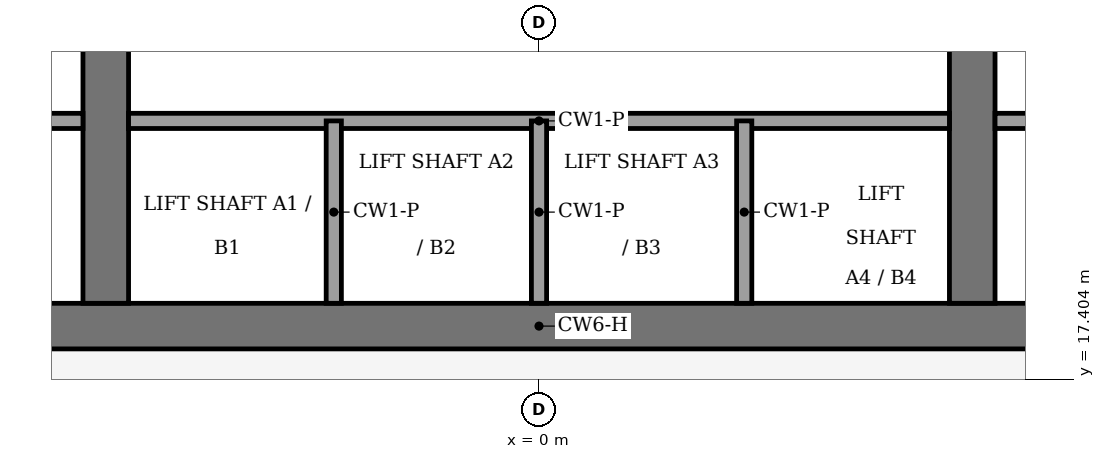
"""IFC4 building model, lengths in metres.
Left out: names, types, materials, properties, quantities, classifications, styles, units other than length and angle.
Written with IfcOpenShell. Run it as: python <this file> out.ifc"""

import sys

from ifc_helpers import new_model, si_unit, direction, frame, frame_2d, origin, place, context, subcontext, project, spatial, rectangle, extrude, element, save


model = new_model("IFC4")
c1 = context("Model", 3, precision=1e-05, world=origin(), true_north=direction((0.0, 1.0)))
c2 = subcontext(c1, "Body", "Model", "MODEL_VIEW")
j1 = project(units=[si_unit("LENGTHUNIT", "METRE"), si_unit("PLANEANGLEUNIT", "RADIAN")], contexts=[c1])
p1 = place(None, origin())
s1 = spatial("IfcSite", under=j1, at=p1, CompositionType="ELEMENT")
p2 = place(p1, origin())
s2 = spatial("IfcBuilding", under=s1, at=p2, CompositionType="ELEMENT")
p3 = place(p2, frame((0.0, 0.0, 340.5)))
s3 = spatial("IfcBuildingStorey", under=s2, at=p3, CompositionType="ELEMENT", Elevation=340.5)
p4 = place(p3, frame((-13.2, 18.1, -0.15), z_axis=(0.0, 0.0, 1.0), x_axis=(1.0, 0.0, 0.0)))
e1 = element("IfcWall", 1, at=p4, inside=s3, PredefinedType="SHEAR", context=c2, shape_type="SweptSolid", body=[
    extrude(rectangle(XDim=26.4, YDim=0.6, at=frame_2d((13.2, 0.0))), origin(), (0.0, 0.0, 1.0), 9.0),
])
p5 = place(p3, frame((-5.7, 18.4, -0.15), z_axis=(0.0, 0.0, 1.0), x_axis=(0.0, 1.0, 0.0)))
e2 = element("IfcWall", 2, at=p5, inside=s3, PredefinedType="SHEAR", context=c2, shape_type="SweptSolid", body=[
    extrude(rectangle(XDim=19.2, YDim=0.6, at=frame_2d((9.6, 0.0))), origin(), (0.0, 0.0, 1.0), 9.0),
])
p6 = place(p5, frame((8.35, 0.0, 0.15)))
e3 = element("IfcOpeningElement", 3, at=p6, cuts=e2, PredefinedType="OPENING", context=c2, shape_type="SweptSolid", body=[
    extrude(rectangle(XDim=0.9, YDim=2.1, at=frame_2d((0.45, 1.05))), frame((0.0, 0.31, 0.0), z_axis=(0.0, -1.0, 0.0), x_axis=(1.0, 0.0, 0.0)), (0.0, 0.0, 1.0), 0.62),
])
p7 = place(p3, frame((5.7, 18.4, -0.15), z_axis=(0.0, 0.0, 1.0), x_axis=(0.0, 1.0, 0.0)))
e4 = element("IfcWall", 4, at=p7, inside=s3, PredefinedType="SHEAR", context=c2, shape_type="SweptSolid", body=[
    extrude(rectangle(XDim=19.2, YDim=0.6, at=frame_2d((9.6, 0.0))), origin(), (0.0, 0.0, 1.0), 9.0),
])
p8 = place(p7, frame((13.3, 0.0, 0.15)))
e5 = element("IfcOpeningElement", 5, at=p8, cuts=e4, PredefinedType="OPENING", context=c2, shape_type="SweptSolid", body=[
    extrude(rectangle(XDim=2.4, YDim=2.4, at=frame_2d((1.2, 1.2))), frame((0.0, 0.31, 0.0), z_axis=(0.0, -1.0, 0.0), x_axis=(1.0, 0.0, 0.0)), (0.0, 0.0, 1.0), 0.62),
])
p9 = place(p3, frame((-12.6, 20.8, 0.0), z_axis=(0.0, 0.0, 1.0), x_axis=(1.0, 0.0, 0.0)))
e6 = element("IfcWall", 6, at=p9, inside=s3, PredefinedType="PARTITIONING", context=c2, shape_type="SweptSolid", body=[
    extrude(rectangle(XDim=6.6, YDim=0.2, at=frame_2d((3.3, 0.0))), origin(), (0.0, 0.0, 1.0), 8.85),
])
p10 = place(p9, frame((2.8, 0.0, 0.0)))
e7 = element("IfcOpeningElement", 7, at=p10, cuts=e6, PredefinedType="OPENING", context=c2, shape_type="SweptSolid", body=[
    extrude(rectangle(XDim=1.0, YDim=2.1, at=frame_2d((0.5, 1.05))), frame((0.0, 0.11, 0.0), z_axis=(0.0, -1.0, 0.0), x_axis=(1.0, 0.0, 0.0)), (0.0, 0.0, 1.0), 0.22),
])
p11 = place(p3, frame((-5.4, 20.8, 0.0), z_axis=(0.0, 0.0, 1.0), x_axis=(1.0, 0.0, 0.0)))
e8 = element("IfcWall", 8, at=p11, inside=s3, PredefinedType="PARTITIONING", context=c2, shape_type="SweptSolid", body=[
    extrude(rectangle(XDim=10.8, YDim=0.2, at=frame_2d((5.4, 0.0))), origin(), (0.0, 0.0, 1.0), 8.85),
])
p12 = place(p3, frame((6.0, 20.8, 0.0), z_axis=(0.0, 0.0, 1.0), x_axis=(1.0, 0.0, 0.0)))
e9 = element("IfcWall", 9, at=p12, inside=s3, PredefinedType="PARTITIONING", context=c2, shape_type="SweptSolid", body=[
    extrude(rectangle(XDim=6.6, YDim=0.2, at=frame_2d((3.3, 0.0))), origin(), (0.0, 0.0, 1.0), 8.85),
])
p13 = place(p12, frame((2.8, 0.0, 0.0)))
e10 = element("IfcOpeningElement", 10, at=p13, cuts=e9, PredefinedType="OPENING", context=c2, shape_type="SweptSolid", body=[
    extrude(rectangle(XDim=1.0, YDim=2.1, at=frame_2d((0.5, 1.05))), frame((0.0, 0.11, 0.0), z_axis=(0.0, -1.0, 0.0), x_axis=(1.0, 0.0, 0.0)), (0.0, 0.0, 1.0), 0.22),
])
for number, where, z_axis, x_axis in (
    (11, (-2.7, 18.4, 0.0), (0.0, 0.0, 1.0), (0.0, 1.0, 0.0)),
    (12, (0.0, 18.4, 0.0), (0.0, 0.0, 1.0), (0.0, 1.0, 0.0)),
    (13, (2.7, 18.4, 0.0), (0.0, 0.0, 1.0), (0.0, 1.0, 0.0)),
):
    element("IfcWall", number, at=place(p3, frame(where, z_axis=z_axis, x_axis=x_axis)), inside=s3, PredefinedType="PARTITIONING", context=c2, shape_type="SweptSolid", body=[
        extrude(rectangle(XDim=2.4, YDim=0.2, at=frame_2d((1.2, 0.0))), origin(), (0.0, 0.0, 1.0), 8.85),
    ])
save(model, sys.argv[1])
